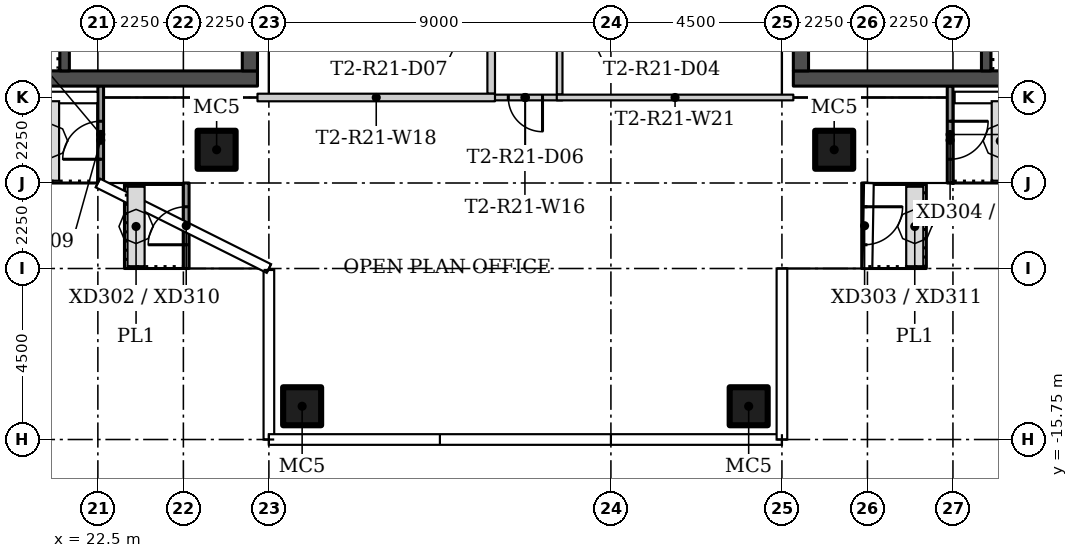
"""IFC4 building model, lengths in metres.
Left out: names, types, materials, properties, quantities, classifications, styles, units other than length and angle.
Written with IfcOpenShell. Run it as: python <this file> out.ifc"""

import sys

from ifc_helpers import new_model, si_unit, direction, frame, frame_2d, origin, origin_2d, place, context, subcontext, project, spatial, rectangle, hollow_rectangle, extrude, element, fill, save


model = new_model("IFC4")
c1 = context("Model", 3, precision=1e-05, world=origin(), true_north=direction((0.0, 1.0)))
c2 = subcontext(c1, "Body", "Model", "MODEL_VIEW")
j1 = project(units=[si_unit("LENGTHUNIT", "METRE"), si_unit("PLANEANGLEUNIT", "RADIAN")], contexts=[c1])
p1 = place(None, origin())
s1 = spatial("IfcSite", under=j1, at=p1, CompositionType="ELEMENT")
p2 = place(p1, origin())
s2 = spatial("IfcBuilding", under=s1, at=p2, CompositionType="ELEMENT")
p3 = place(p2, frame((0.0, 0.0, 194.4)))
s3 = spatial("IfcBuildingStorey", under=s2, at=p3, CompositionType="ELEMENT", Elevation=194.4)
for number, where in (
    (1, (25.625, -8.125, 0.0)),
    (2, (41.875, -8.125, 0.0)),
    (3, (39.625, -14.875, 0.0)),
    (4, (27.875, -14.875, 0.0)),
):
    element("IfcColumn", number, at=place(p3, frame(where)), inside=s3, PredefinedType="COLUMN", context=c2, shape_type="SweptSolid", body=[
        extrude(hollow_rectangle(XDim=1.0, YDim=1.0, WallThickness=0.04, at=origin_2d()), origin(), (0.0, 0.0, 1.0), 3.55),
    ])
p4 = place(p3, frame((32.85, -6.65, 0.0), z_axis=(0.0, 0.0, 1.0), x_axis=(0.0, 1.0, 0.0)))
e5 = element("IfcWall", 5, at=p4, inside=s3, PredefinedType="PARTITIONING", context=c2, shape_type="SweptSolid", body=[
    extrude(rectangle(XDim=6.6, YDim=0.2, at=frame_2d((3.3, 0.0))), origin(), (0.0, 0.0, 1.0), 3.55),
])
p5 = place(p4, frame((2.85, 0.0, 0.0)))
e6 = element("IfcOpeningElement", 6, at=p5, cuts=e5, PredefinedType="OPENING", context=c2, shape_type="SweptSolid", body=[
    extrude(rectangle(XDim=0.9, YDim=2.1, at=frame_2d((0.45, 1.05))), frame((0.0, 0.11, 0.0), z_axis=(0.0, -1.0, 0.0), x_axis=(1.0, 0.0, 0.0)), (0.0, 0.0, 1.0), 0.22),
])
p6 = place(p3, frame((34.65, -0.025, 0.0), z_axis=(0.0, 0.0, 1.0), x_axis=(0.0, -1.0, 0.0)))
e7 = element("IfcWall", 7, at=p6, inside=s3, PredefinedType="PARTITIONING", context=c2, shape_type="SweptSolid", body=[
    extrude(rectangle(XDim=6.65, YDim=0.15, at=frame_2d((3.325, 0.0))), origin(), (0.0, 0.0, 1.0), 3.55),
])
p7 = place(p6, frame((2.875, 0.0, 0.0)))
e8 = element("IfcOpeningElement", 8, at=p7, cuts=e7, PredefinedType="OPENING", context=c2, shape_type="SweptSolid", body=[
    extrude(rectangle(XDim=0.9, YDim=2.1, at=frame_2d((0.45, 1.05))), frame((0.0, 0.085, 0.0), z_axis=(0.0, -1.0, 0.0), x_axis=(1.0, 0.0, 0.0)), (0.0, 0.0, 1.0), 0.17),
])
p8 = place(p3, frame((34.725, -6.75, 0.0), z_axis=(0.0, 0.0, 1.0), x_axis=(-1.0, 0.0, 0.0)))
e9 = element("IfcWall", 9, at=p8, inside=s3, PredefinedType="PARTITIONING", context=c2, shape_type="SweptSolid", body=[
    extrude(rectangle(XDim=1.976, YDim=0.15, at=frame_2d((0.988, 0.0))), origin(), (0.0, 0.0, 1.0), 3.55),
])
p9 = place(p8, frame((0.525, 0.0, 0.0)))
e10 = element("IfcOpeningElement", 10, at=p9, cuts=e9, PredefinedType="OPENING", context=c2, shape_type="SweptSolid", body=[
    extrude(rectangle(XDim=0.9, YDim=2.1, at=frame_2d((0.45, 1.05))), frame((0.0, 0.085, 0.0), z_axis=(0.0, -1.0, 0.0), x_axis=(1.0, 0.0, 0.0)), (0.0, 0.0, 1.0), 0.17),
])
p10 = place(p3, frame((26.7, -6.75, 0.0)))
e11 = element("IfcWall", 11, at=p10, inside=s3, PredefinedType="PARTITIONING", context=c2, shape_type="SweptSolid", body=[
    extrude(rectangle(XDim=6.25, YDim=0.2, at=frame_2d((3.125, 0.0))), origin(), (0.0, 0.0, 1.0), 3.55),
])
p11 = place(p3, frame((34.575, -6.75, 0.0)))
e12 = element("IfcWall", 12, at=p11, inside=s3, PredefinedType="PARTITIONING", context=c2, shape_type="SweptSolid", body=[
    extrude(rectangle(XDim=6.225, YDim=0.15, at=frame_2d((3.112, 0.0))), origin(), (0.0, 0.0, 1.0), 3.55),
])
p12 = place(p3, frame((22.575, -9.0, 0.0), z_axis=(0.0, 0.0, 1.0), x_axis=(0.0, 1.0, 0.0)))
e13 = element("IfcWall", 13, at=p12, inside=s3, PredefinedType="SOLIDWALL", context=c2, shape_type="SweptSolid", body=[
    extrude(rectangle(XDim=2.557, YDim=0.15, at=frame_2d((1.278, 0.0))), origin(), (0.0, 0.0, 1.0), 3.45),
])
p13 = place(p12, frame((0.625, 0.0, 0.0)))
e14 = element("IfcOpeningElement", 14, at=p13, cuts=e13, PredefinedType="OPENING", context=c2, shape_type="SweptSolid", body=[
    extrude(rectangle(XDim=1.0, YDim=2.4, at=frame_2d((0.5, 1.2))), frame((0.0, 0.085, 0.0), z_axis=(0.0, -1.0, 0.0), x_axis=(1.0, 0.0, 0.0)), (0.0, 0.0, 1.0), 0.17),
])
p14 = place(p3, frame((24.825, -11.25, 0.0), z_axis=(0.0, 0.0, 1.0), x_axis=(0.0, 1.0, 0.0)))
e15 = element("IfcWall", 15, at=p14, inside=s3, PredefinedType="SOLIDWALL", context=c2, shape_type="SweptSolid", body=[
    extrude(rectangle(XDim=2.25, YDim=0.15, at=frame_2d((1.125, 0.0))), origin(), (0.0, 0.0, 1.0), 3.45),
])
p15 = place(p14, frame((0.625, 0.0, 0.0)))
e16 = element("IfcOpeningElement", 16, at=p15, cuts=e15, PredefinedType="OPENING", context=c2, shape_type="SweptSolid", body=[
    extrude(rectangle(XDim=1.0, YDim=2.4, at=frame_2d((0.5, 1.2))), frame((0.0, 0.085, 0.0), z_axis=(0.0, -1.0, 0.0), x_axis=(1.0, 0.0, 0.0)), (0.0, 0.0, 1.0), 0.17),
])
p16 = place(p3, frame((42.675, -9.0, 0.0), z_axis=(0.0, 0.0, 1.0), x_axis=(0.0, -1.0, 0.0)))
e17 = element("IfcWall", 17, at=p16, inside=s3, PredefinedType="SOLIDWALL", context=c2, shape_type="SweptSolid", body=[
    extrude(rectangle(XDim=2.25, YDim=0.15, at=frame_2d((1.125, 0.0))), origin(), (0.0, 0.0, 1.0), 3.45),
])
p17 = place(p16, frame((0.625, 0.0, 0.0)))
e18 = element("IfcOpeningElement", 18, at=p17, cuts=e17, PredefinedType="OPENING", context=c2, shape_type="SweptSolid", body=[
    extrude(rectangle(XDim=1.0, YDim=2.4, at=frame_2d((0.5, 1.2))), frame((0.0, 0.085, 0.0), z_axis=(0.0, -1.0, 0.0), x_axis=(1.0, 0.0, 0.0)), (0.0, 0.0, 1.0), 0.17),
])
p18 = place(p3, frame((44.925, -6.448, 0.0), z_axis=(0.0, 0.0, 1.0), x_axis=(0.0, -1.0, 0.0)))
e19 = element("IfcWall", 19, at=p18, inside=s3, PredefinedType="SOLIDWALL", context=c2, shape_type="SweptSolid", body=[
    extrude(rectangle(XDim=2.552, YDim=0.15, at=frame_2d((1.276, 0.0))), origin(), (0.0, 0.0, 1.0), 3.45),
])
p19 = place(p18, frame((0.927, 0.0, 0.0)))
e20 = element("IfcOpeningElement", 20, at=p19, cuts=e19, PredefinedType="OPENING", context=c2, shape_type="SweptSolid", body=[
    extrude(rectangle(XDim=1.0, YDim=2.4, at=frame_2d((0.5, 1.2))), frame((0.0, 0.085, 0.0), z_axis=(0.0, -1.0, 0.0), x_axis=(1.0, 0.0, 0.0)), (0.0, 0.0, 1.0), 0.17),
])
p20 = place(p3, frame((13.8, -6.25, 0.0)))
e21 = element("IfcWall", 21, at=p20, inside=s3, PredefinedType="SHEAR", context=c2, shape_type="SweptSolid", body=[
    extrude(rectangle(XDim=12.9, YDim=0.4, at=frame_2d((6.45, 0.0))), origin(), (0.0, 0.0, 1.0), 3.55),
])
p21 = place(p3, frame((26.5, 6.05, 0.0), z_axis=(0.0, 0.0, 1.0), x_axis=(0.0, -1.0, 0.0)))
e22 = element("IfcWall", 22, at=p21, inside=s3, PredefinedType="SHEAR", context=c2, shape_type="SweptSolid", body=[
    extrude(rectangle(XDim=12.1, YDim=0.4, at=frame_2d((6.05, 0.0))), origin(), (0.0, 0.0, 1.0), 3.55),
])
p22 = place(p21, frame((10.1, 0.0, 0.0)))
e23 = element("IfcOpeningElement", 23, at=p22, cuts=e22, PredefinedType="OPENING", context=c2, shape_type="SweptSolid", body=[
    extrude(rectangle(XDim=1.2, YDim=2.1, at=frame_2d((0.6, 1.05))), frame((0.0, 0.21, 0.0), z_axis=(0.0, -1.0, 0.0), x_axis=(1.0, 0.0, 0.0)), (0.0, 0.0, 1.0), 0.42),
])
p23 = place(p21, frame((3.9, 0.0, 0.0)))
e24 = element("IfcOpeningElement", 24, at=p23, cuts=e22, PredefinedType="OPENING", context=c2, shape_type="SweptSolid", body=[
    extrude(rectangle(XDim=1.8, YDim=2.4, at=frame_2d((0.9, 1.2))), frame((0.0, 0.21, 0.0), z_axis=(0.0, -1.0, 0.0), x_axis=(1.0, 0.0, 0.0)), (0.0, 0.0, 1.0), 0.42),
])
p24 = place(p3, frame((21.625, -6.05, 0.0), z_axis=(0.0, 0.0, 1.0), x_axis=(0.0, 1.0, 0.0)))
e25 = element("IfcWall", 25, at=p24, inside=s3, PredefinedType="SHEAR", context=c2, shape_type="SweptSolid", body=[
    extrude(rectangle(XDim=2.55, YDim=0.25, at=frame_2d((1.275, 0.0))), origin(), (0.0, 0.0, 1.0), 3.55),
])
p25 = place(p3, frame((53.7, -6.25, 0.0), z_axis=(0.0, 0.0, 1.0), x_axis=(-1.0, 0.0, 0.0)))
e26 = element("IfcWall", 26, at=p25, inside=s3, PredefinedType="SHEAR", context=c2, shape_type="SweptSolid", body=[
    extrude(rectangle(XDim=12.9, YDim=0.4, at=frame_2d((6.45, 0.0))), origin(), (0.0, 0.0, 1.0), 3.55),
])
p26 = place(p3, frame((41.0, -6.05, 0.0), z_axis=(0.0, 0.0, 1.0), x_axis=(0.0, 1.0, 0.0)))
e27 = element("IfcWall", 27, at=p26, inside=s3, PredefinedType="SHEAR", context=c2, shape_type="SweptSolid", body=[
    extrude(rectangle(XDim=12.1, YDim=0.4, at=frame_2d((6.05, 0.0))), origin(), (0.0, 0.0, 1.0), 3.55),
])
p27 = place(p26, frame((0.8, 0.0, 0.0)))
e28 = element("IfcOpeningElement", 28, at=p27, cuts=e27, PredefinedType="OPENING", context=c2, shape_type="SweptSolid", body=[
    extrude(rectangle(XDim=1.2, YDim=2.1, at=frame_2d((0.6, 1.05))), frame((0.0, 0.21, 0.0), z_axis=(0.0, -1.0, 0.0), x_axis=(1.0, 0.0, 0.0)), (0.0, 0.0, 1.0), 0.42),
])
p28 = place(p26, frame((6.4, 0.0, 0.0)))
e29 = element("IfcOpeningElement", 29, at=p28, cuts=e27, PredefinedType="OPENING", context=c2, shape_type="SweptSolid", body=[
    extrude(rectangle(XDim=1.8, YDim=2.4, at=frame_2d((0.9, 1.2))), frame((0.0, 0.21, 0.0), z_axis=(0.0, -1.0, 0.0), x_axis=(1.0, 0.0, 0.0)), (0.0, 0.0, 1.0), 0.42),
])
p29 = place(p3, frame((45.875, -6.05, 0.0), z_axis=(0.0, 0.0, 1.0), x_axis=(0.0, 1.0, 0.0)))
e30 = element("IfcWall", 30, at=p29, inside=s3, PredefinedType="SHEAR", context=c2, shape_type="SweptSolid", body=[
    extrude(rectangle(XDim=2.55, YDim=0.25, at=frame_2d((1.275, 0.0))), origin(), (0.0, 0.0, 1.0), 3.55),
])
p30 = place(p9, origin())
e31 = element("IfcDoor", 31, at=p30, inside=s3, OperationType="SINGLE_SWING_LEFT", PredefinedType="DOOR", context=c2, shape_type="SweptSolid", body=[
    extrude(rectangle(XDim=0.9, YDim=2.1, at=frame_2d((0.45, 1.05))), frame((0.0, 0.025, 0.0), z_axis=(0.0, -1.0, 0.0), x_axis=(1.0, 0.0, 0.0)), (0.0, 0.0, 1.0), 0.05),
])
fill(e10, e31)
p31 = place(p13, origin())
e32 = element("IfcDoor", 32, at=p31, inside=s3, OperationType="SINGLE_SWING_LEFT", PredefinedType="DOOR", context=c2, shape_type="SweptSolid", body=[
    extrude(rectangle(XDim=1.0, YDim=2.4, at=frame_2d((0.5, 1.2))), frame((0.0, 0.025, 0.0), z_axis=(0.0, -1.0, 0.0), x_axis=(1.0, 0.0, 0.0)), (0.0, 0.0, 1.0), 0.05),
])
fill(e14, e32)
p32 = place(p15, origin())
e33 = element("IfcDoor", 33, at=p32, inside=s3, OperationType="SINGLE_SWING_RIGHT", PredefinedType="DOOR", context=c2, shape_type="SweptSolid", body=[
    extrude(rectangle(XDim=1.0, YDim=2.4, at=frame_2d((0.5, 1.2))), frame((0.0, 0.025, 0.0), z_axis=(0.0, -1.0, 0.0), x_axis=(1.0, 0.0, 0.0)), (0.0, 0.0, 1.0), 0.05),
])
fill(e16, e33)
p33 = place(p17, origin())
e34 = element("IfcDoor", 34, at=p33, inside=s3, OperationType="SINGLE_SWING_LEFT", PredefinedType="DOOR", context=c2, shape_type="SweptSolid", body=[
    extrude(rectangle(XDim=1.0, YDim=2.4, at=frame_2d((0.5, 1.2))), frame((0.0, 0.025, 0.0), z_axis=(0.0, -1.0, 0.0), x_axis=(1.0, 0.0, 0.0)), (0.0, 0.0, 1.0), 0.05),
])
fill(e18, e34)
p34 = place(p19, origin())
e35 = element("IfcDoor", 35, at=p34, inside=s3, OperationType="SINGLE_SWING_RIGHT", PredefinedType="DOOR", context=c2, shape_type="SweptSolid", body=[
    extrude(rectangle(XDim=1.0, YDim=2.4, at=frame_2d((0.5, 1.2))), frame((0.0, 0.025, 0.0), z_axis=(0.0, -1.0, 0.0), x_axis=(1.0, 0.0, 0.0)), (0.0, 0.0, 1.0), 0.05),
])
fill(e20, e35)
save(model, sys.argv[1])
